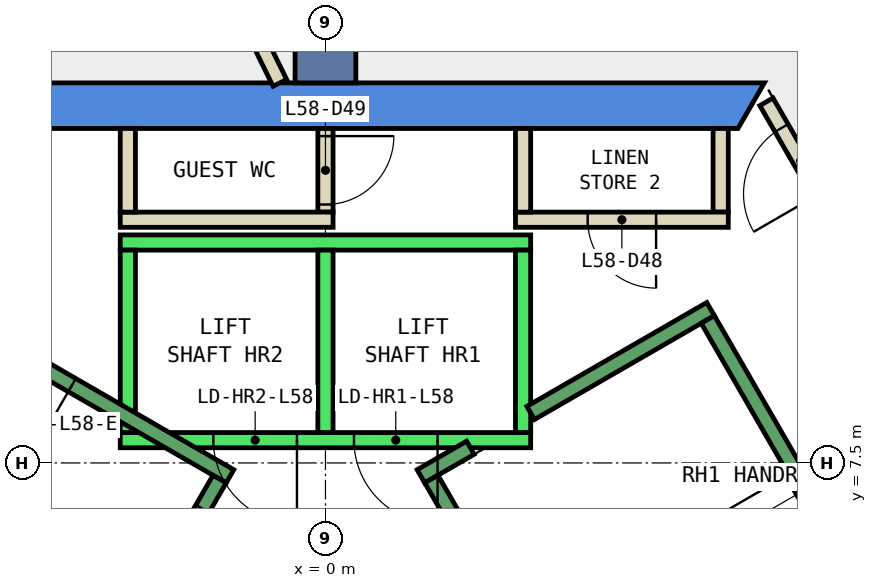
"""IFC4 building model, lengths in metres.
Left out: names, types, materials, properties, quantities, classifications, styles, units other than length and angle.
Written with IfcOpenShell. Run it as: python <this file> out.ifc"""

import sys

from ifc_helpers import new_model, si_unit, direction, frame, frame_2d, origin, place, context, subcontext, project, spatial, polyline, rectangle, outline, extrude, element, fill, save


model = new_model("IFC4")
c1 = context("Model", 3, precision=1e-05, world=origin(), true_north=direction((0.0, 1.0)))
c2 = subcontext(c1, "Body", "Model", "MODEL_VIEW")
j1 = project(units=[si_unit("LENGTHUNIT", "METRE"), si_unit("PLANEANGLEUNIT", "RADIAN")], contexts=[c1])
p1 = place(None, origin())
s1 = spatial("IfcSite", under=j1, at=p1, CompositionType="ELEMENT")
p2 = place(p1, origin())
s2 = spatial("IfcBuilding", under=s1, at=p2, CompositionType="ELEMENT")
p3 = place(p2, frame((0.0, 0.0, 255.8)))
s3 = spatial("IfcBuildingStorey", under=s2, at=p3, CompositionType="ELEMENT", Elevation=255.8)
p4 = place(p3, frame((0.0, 0.0, -0.34)))
e1 = element("IfcWall", 1, at=p4, inside=s3, PredefinedType="SHEAR", context=c2, shape_type="SweptSolid", body=[
    extrude(outline(polyline([(5.774, 12.5), (-5.774, 12.5), (-5.427, 11.9), (5.427, 11.9), (5.774, 12.5)])), origin(), (0.0, 0.0, 1.0), 3.6),
])
p5 = place(p3, frame((0.0, 12.5, -0.34), z_axis=(0.0, 0.0, 1.0), x_axis=(0.0, 1.0, 0.0)))
e2 = element("IfcWall", 2, at=p5, inside=s3, PredefinedType="SHEAR", context=c2, shape_type="SweptSolid", body=[
    extrude(rectangle(XDim=9.0, YDim=0.8, at=frame_2d((4.5, 0.0))), origin(), (0.0, 0.0, 1.0), 3.6),
])
p6 = place(p3, frame((-0.6, 12.5, 0.0), z_axis=(0.0, 0.0, 1.0), x_axis=(-0.440531456598, 0.897737175206, 0.0)))
e3 = element("IfcWall", 3, at=p6, inside=s3, PredefinedType="PARTITIONING", context=c2, shape_type="SweptSolid", body=[
    extrude(rectangle(XDim=1.918, YDim=0.2, at=frame_2d((0.959, 0.0))), origin(), (0.0, 0.0, 1.0), 3.26),
])
p7 = place(p3, frame((5.2, 11.9, 0.0), z_axis=(0.0, 0.0, 1.0), x_axis=(0.0, -1.0, 0.0)))
e4 = element("IfcWall", 4, at=p7, inside=s3, PredefinedType="PARTITIONING", context=c2, shape_type="SweptSolid", body=[
    extrude(rectangle(XDim=1.1, YDim=0.2, at=frame_2d((0.55, 0.0))), origin(), (0.0, 0.0, 1.0), 3.26),
])
p8 = place(p3, frame((5.3, 10.7, 0.0), z_axis=(0.0, 0.0, 1.0), x_axis=(-1.0, 0.0, 0.0)))
e5 = element("IfcWall", 5, at=p8, inside=s3, PredefinedType="PARTITIONING", context=c2, shape_type="SweptSolid", body=[
    extrude(rectangle(XDim=2.8, YDim=0.2, at=frame_2d((1.4, 0.0))), origin(), (0.0, 0.0, 1.0), 3.26),
])
p9 = place(p8, frame((0.95, 0.0, 0.0)))
e6 = element("IfcOpeningElement", 6, at=p9, cuts=e5, PredefinedType="OPENING", context=c2, shape_type="SweptSolid", body=[
    extrude(rectangle(XDim=0.9, YDim=2.1, at=frame_2d((0.45, 1.05))), frame((0.0, 0.11, 0.0), z_axis=(0.0, -1.0, 0.0), x_axis=(1.0, 0.0, 0.0)), (0.0, 0.0, 1.0), 0.22),
])
p10 = place(p3, frame((2.6, 10.8, 0.0), z_axis=(0.0, 0.0, 1.0), x_axis=(0.0, 1.0, 0.0)))
e7 = element("IfcWall", 7, at=p10, inside=s3, PredefinedType="PARTITIONING", context=c2, shape_type="SweptSolid", body=[
    extrude(rectangle(XDim=1.1, YDim=0.2, at=frame_2d((0.55, 0.0))), origin(), (0.0, 0.0, 1.0), 3.26),
])
p11 = place(p3, frame((0.0, 11.9, 0.0), z_axis=(0.0, 0.0, 1.0), x_axis=(0.0, -1.0, 0.0)))
e8 = element("IfcWall", 8, at=p11, inside=s3, PredefinedType="PARTITIONING", context=c2, shape_type="SweptSolid", body=[
    extrude(rectangle(XDim=1.1, YDim=0.2, at=frame_2d((0.55, 0.0))), origin(), (0.0, 0.0, 1.0), 3.26),
])
p12 = place(p11, frame((0.1, 0.0, 0.0)))
e9 = element("IfcOpeningElement", 9, at=p12, cuts=e8, PredefinedType="OPENING", context=c2, shape_type="SweptSolid", body=[
    extrude(rectangle(XDim=0.9, YDim=2.1, at=frame_2d((0.45, 1.05))), frame((0.0, 0.11, 0.0), z_axis=(0.0, -1.0, 0.0), x_axis=(1.0, 0.0, 0.0)), (0.0, 0.0, 1.0), 0.22),
])
p13 = place(p3, frame((0.1, 10.7, 0.0), z_axis=(0.0, 0.0, 1.0), x_axis=(-1.0, 0.0, 0.0)))
e10 = element("IfcWall", 10, at=p13, inside=s3, PredefinedType="PARTITIONING", context=c2, shape_type="SweptSolid", body=[
    extrude(rectangle(XDim=2.8, YDim=0.2, at=frame_2d((1.4, 0.0))), origin(), (0.0, 0.0, 1.0), 3.26),
])
p14 = place(p3, frame((-2.6, 10.8, 0.0), z_axis=(0.0, 0.0, 1.0), x_axis=(0.0, 1.0, 0.0)))
e11 = element("IfcWall", 11, at=p14, inside=s3, PredefinedType="PARTITIONING", context=c2, shape_type="SweptSolid", body=[
    extrude(rectangle(XDim=1.1, YDim=0.2, at=frame_2d((0.55, 0.0))), origin(), (0.0, 0.0, 1.0), 3.26),
])
p15 = place(p3, frame((6.699, 10.697, 0.0), z_axis=(0.0, 0.0, 1.0), x_axis=(-0.499914839587, 0.866074565589, 0.0)))
e12 = element("IfcWall", 12, at=p15, inside=s3, PredefinedType="PARTITIONING", context=c2, shape_type="SweptSolid", body=[
    extrude(rectangle(XDim=1.794, YDim=0.2, at=frame_2d((0.897, 0.0))), origin(), (0.0, 0.0, 1.0), 2.4),
])
p16 = place(p15, frame((0.397, 0.0, 0.0)))
e13 = element("IfcOpeningElement", 13, at=p16, cuts=e12, PredefinedType="OPENING", context=c2, shape_type="SweptSolid", body=[
    extrude(rectangle(XDim=1.0, YDim=2.1, at=frame_2d((0.5, 1.05))), frame((0.0, 0.11, 0.0), z_axis=(0.0, -1.0, 0.0), x_axis=(1.0, 0.0, 0.0)), (0.0, 0.0, 1.0), 0.22),
])
p17 = place(p3, frame((2.7, 7.8, 0.0), z_axis=(0.0, 0.0, 1.0), x_axis=(-1.0, 0.0, 0.0)))
e14 = element("IfcWall", 14, at=p17, inside=s3, PredefinedType="STANDARD", context=c2, shape_type="SweptSolid", body=[
    extrude(rectangle(XDim=5.4, YDim=0.2, at=frame_2d((2.7, 0.0))), origin(), (0.0, 0.0, 1.0), 3.26),
])
p18 = place(p17, frame((1.225, 0.0, 0.0)))
e15 = element("IfcOpeningElement", 15, at=p18, cuts=e14, PredefinedType="OPENING", context=c2, shape_type="SweptSolid", body=[
    extrude(rectangle(XDim=1.1, YDim=2.1, at=frame_2d((0.55, 1.05))), frame((0.0, 0.11, 0.0), z_axis=(0.0, -1.0, 0.0), x_axis=(1.0, 0.0, 0.0)), (0.0, 0.0, 1.0), 0.22),
])
p19 = place(p17, frame((3.075, 0.0, 0.0)))
e16 = element("IfcOpeningElement", 16, at=p19, cuts=e14, PredefinedType="OPENING", context=c2, shape_type="SweptSolid", body=[
    extrude(rectangle(XDim=1.1, YDim=2.1, at=frame_2d((0.55, 1.05))), frame((0.0, 0.11, 0.0), z_axis=(0.0, -1.0, 0.0), x_axis=(1.0, 0.0, 0.0)), (0.0, 0.0, 1.0), 0.22),
])
p20 = place(p3, frame((2.7, 10.4, 0.0), z_axis=(0.0, 0.0, 1.0), x_axis=(-1.0, 0.0, 0.0)))
e17 = element("IfcWall", 17, at=p20, inside=s3, PredefinedType="STANDARD", context=c2, shape_type="SweptSolid", body=[
    extrude(rectangle(XDim=5.4, YDim=0.2, at=frame_2d((2.7, 0.0))), origin(), (0.0, 0.0, 1.0), 3.26),
])
for number, where, z_axis, x_axis in (
    (18, (2.6, 7.9, 0.0), (0.0, 0.0, 1.0), (0.0, 1.0, 0.0)),
    (19, (0.0, 7.9, 0.0), (0.0, 0.0, 1.0), (0.0, 1.0, 0.0)),
    (20, (-2.6, 7.9, 0.0), (0.0, 0.0, 1.0), (0.0, 1.0, 0.0)),
):
    element("IfcWall", number, at=place(p3, frame(where, z_axis=z_axis, x_axis=x_axis)), inside=s3, PredefinedType="STANDARD", context=c2, shape_type="SweptSolid", body=[
        extrude(rectangle(XDim=2.4, YDim=0.2, at=frame_2d((1.2, 0.0))), origin(), (0.0, 0.0, 1.0), 3.26),
    ])
p21 = place(p3, frame((2.7, 8.158, 0.0), z_axis=(0.0, 0.0, 1.0), x_axis=(0.86611865017, 0.499838457731, 0.0)))
e21 = element("IfcWall", 21, at=p21, inside=s3, PredefinedType="STANDARD", context=c2, shape_type="SweptSolid", body=[
    extrude(rectangle(XDim=2.733, YDim=0.2, at=frame_2d((1.366, 0.0))), origin(), (0.0, 0.0, 1.0), 3.26),
])
p22 = place(p3, frame((1.256, 7.324, 0.0), z_axis=(0.0, 0.0, 1.0), x_axis=(0.865915093549, 0.500191014278, 0.0)))
e22 = element("IfcWall", 22, at=p22, inside=s3, PredefinedType="STANDARD", context=c2, shape_type="SweptSolid", body=[
    extrude(rectangle(XDim=0.752, YDim=0.2, at=frame_2d((0.376, 0.0))), origin(), (0.0, 0.0, 1.0), 3.26),
])
p23 = place(p3, frame((4.843, 1.312, 0.0), z_axis=(0.0, 0.0, 1.0), x_axis=(-0.499963383562, 0.866046543262, 0.0)))
e23 = element("IfcWall", 23, at=p23, inside=s3, PredefinedType="STANDARD", context=c2, shape_type="SweptSolid", body=[
    extrude(rectangle(XDim=6.9, YDim=0.2, at=frame_2d((3.45, 0.0))), origin(), (0.0, 0.0, 1.0), 3.26),
])
p24 = place(p23, frame((0.45, 0.0, 0.0)))
e24 = element("IfcOpeningElement", 24, at=p24, cuts=e23, PredefinedType="OPENING", context=c2, shape_type="SweptSolid", body=[
    extrude(rectangle(XDim=1.1, YDim=2.2, at=frame_2d((0.55, 1.1))), frame((0.0, 0.11, 0.0), z_axis=(0.0, -1.0, 0.0), x_axis=(1.0, 0.0, 0.0)), (0.0, 0.0, 1.0), 0.22),
])
p25 = place(p3, frame((8.48, 3.412, 0.0), z_axis=(0.0, 0.0, 1.0), x_axis=(-0.499978703459, 0.866037698999, 0.0)))
e25 = element("IfcWall", 25, at=p25, inside=s3, PredefinedType="STANDARD", context=c2, shape_type="SweptSolid", body=[
    extrude(rectangle(XDim=6.9, YDim=0.2, at=frame_2d((3.45, 0.0))), origin(), (0.0, 0.0, 1.0), 3.26),
])
p26 = place(p3, frame((-1.256, 7.324, 0.0), z_axis=(0.0, 0.0, 1.0), x_axis=(-0.866046073146, 0.499964197906, 0.0)))
e26 = element("IfcWall", 26, at=p26, inside=s3, PredefinedType="STANDARD", context=c2, shape_type="SweptSolid", body=[
    extrude(rectangle(XDim=4.4, YDim=0.2, at=frame_2d((2.2, 0.0))), origin(), (0.0, 0.0, 1.0), 3.26),
])
p27 = place(p26, frame((2.4, 0.0, 0.0)))
e27 = element("IfcOpeningElement", 27, at=p27, cuts=e26, PredefinedType="OPENING", context=c2, shape_type="SweptSolid", body=[
    extrude(rectangle(XDim=1.1, YDim=2.2, at=frame_2d((0.55, 1.1))), frame((0.0, 0.11, 0.0), z_axis=(0.0, -1.0, 0.0), x_axis=(1.0, 0.0, 0.0)), (0.0, 0.0, 1.0), 0.22),
])
p28 = place(p3, frame((-1.393, 7.288, 0.0), z_axis=(0.0, 0.0, 1.0), x_axis=(-0.499963383562, -0.866046543262, 0.0)))
e28 = element("IfcWall", 28, at=p28, inside=s3, PredefinedType="STANDARD", context=c2, shape_type="SweptSolid", body=[
    extrude(rectangle(XDim=6.9, YDim=0.2, at=frame_2d((3.45, 0.0))), origin(), (0.0, 0.0, 1.0), 3.26),
])
p29 = place(p28, frame((0.45, 0.0, 0.0)))
e29 = element("IfcOpeningElement", 29, at=p29, cuts=e28, PredefinedType="OPENING", context=c2, shape_type="SweptSolid", body=[
    extrude(rectangle(XDim=1.1, YDim=2.2, at=frame_2d((0.55, 1.1))), frame((0.0, 0.11, 0.0), z_axis=(0.0, -1.0, 0.0), x_axis=(1.0, 0.0, 0.0)), (0.0, 0.0, 1.0), 0.22),
])
p30 = place(p9, origin())
e30 = element("IfcDoor", 30, at=p30, inside=s3, OperationType="SINGLE_SWING_RIGHT", PredefinedType="DOOR", context=c2, shape_type="SweptSolid", body=[
    extrude(rectangle(XDim=0.9, YDim=2.1, at=frame_2d((0.45, 1.05))), frame((0.0, 0.025, 0.0), z_axis=(0.0, -1.0, 0.0), x_axis=(1.0, 0.0, 0.0)), (0.0, 0.0, 1.0), 0.05),
])
fill(e6, e30)
p31 = place(p12, origin())
e31 = element("IfcDoor", 31, at=p31, inside=s3, OperationType="SINGLE_SWING_LEFT", PredefinedType="DOOR", context=c2, shape_type="SweptSolid", body=[
    extrude(rectangle(XDim=0.9, YDim=2.1, at=frame_2d((0.45, 1.05))), frame((0.0, 0.025, 0.0), z_axis=(0.0, -1.0, 0.0), x_axis=(1.0, 0.0, 0.0)), (0.0, 0.0, 1.0), 0.05),
])
fill(e9, e31)
p32 = place(p16, origin())
e32 = element("IfcDoor", 32, at=p32, inside=s3, OperationType="SINGLE_SWING_LEFT", PredefinedType="DOOR", context=c2, shape_type="SweptSolid", body=[
    extrude(rectangle(XDim=1.0, YDim=2.1, at=frame_2d((0.5, 1.05))), frame((0.0, 0.025, 0.0), z_axis=(0.0, -1.0, 0.0), x_axis=(1.0, 0.0, 0.0)), (0.0, 0.0, 1.0), 0.05),
])
fill(e13, e32)
p33 = place(p18, origin())
e33 = element("IfcDoor", 33, at=p33, inside=s3, OperationType="SLIDING_TO_LEFT", PredefinedType="DOOR", context=c2, shape_type="SweptSolid", body=[
    extrude(rectangle(XDim=1.1, YDim=2.1, at=frame_2d((0.55, 1.05))), frame((0.0, 0.025, 0.0), z_axis=(0.0, -1.0, 0.0), x_axis=(1.0, 0.0, 0.0)), (0.0, 0.0, 1.0), 0.05),
])
fill(e15, e33)
p34 = place(p19, origin())
e34 = element("IfcDoor", 34, at=p34, inside=s3, OperationType="SLIDING_TO_LEFT", PredefinedType="DOOR", context=c2, shape_type="SweptSolid", body=[
    extrude(rectangle(XDim=1.1, YDim=2.1, at=frame_2d((0.55, 1.05))), frame((0.0, 0.025, 0.0), z_axis=(0.0, -1.0, 0.0), x_axis=(1.0, 0.0, 0.0)), (0.0, 0.0, 1.0), 0.05),
])
fill(e16, e34)
p35 = place(p29, origin())
e35 = element("IfcDoor", 35, at=p35, inside=s3, OperationType="SINGLE_SWING_LEFT", PredefinedType="DOOR", context=c2, shape_type="SweptSolid", body=[
    extrude(rectangle(XDim=1.1, YDim=2.2, at=frame_2d((0.55, 1.1))), frame((0.0, 0.025, 0.0), z_axis=(0.0, -1.0, 0.0), x_axis=(1.0, 0.0, 0.0)), (0.0, 0.0, 1.0), 0.05),
])
fill(e29, e35)
p36 = place(p27, origin())
e36 = element("IfcDoor", 36, at=p36, inside=s3, OperationType="SINGLE_SWING_LEFT", PredefinedType="DOOR", context=c2, shape_type="SweptSolid", body=[
    extrude(rectangle(XDim=1.1, YDim=2.2, at=frame_2d((0.55, 1.1))), frame((0.0, 0.025, 0.0), z_axis=(0.0, -1.0, 0.0), x_axis=(1.0, 0.0, 0.0)), (0.0, 0.0, 1.0), 0.05),
])
fill(e27, e36)
save(model, sys.argv[1])
